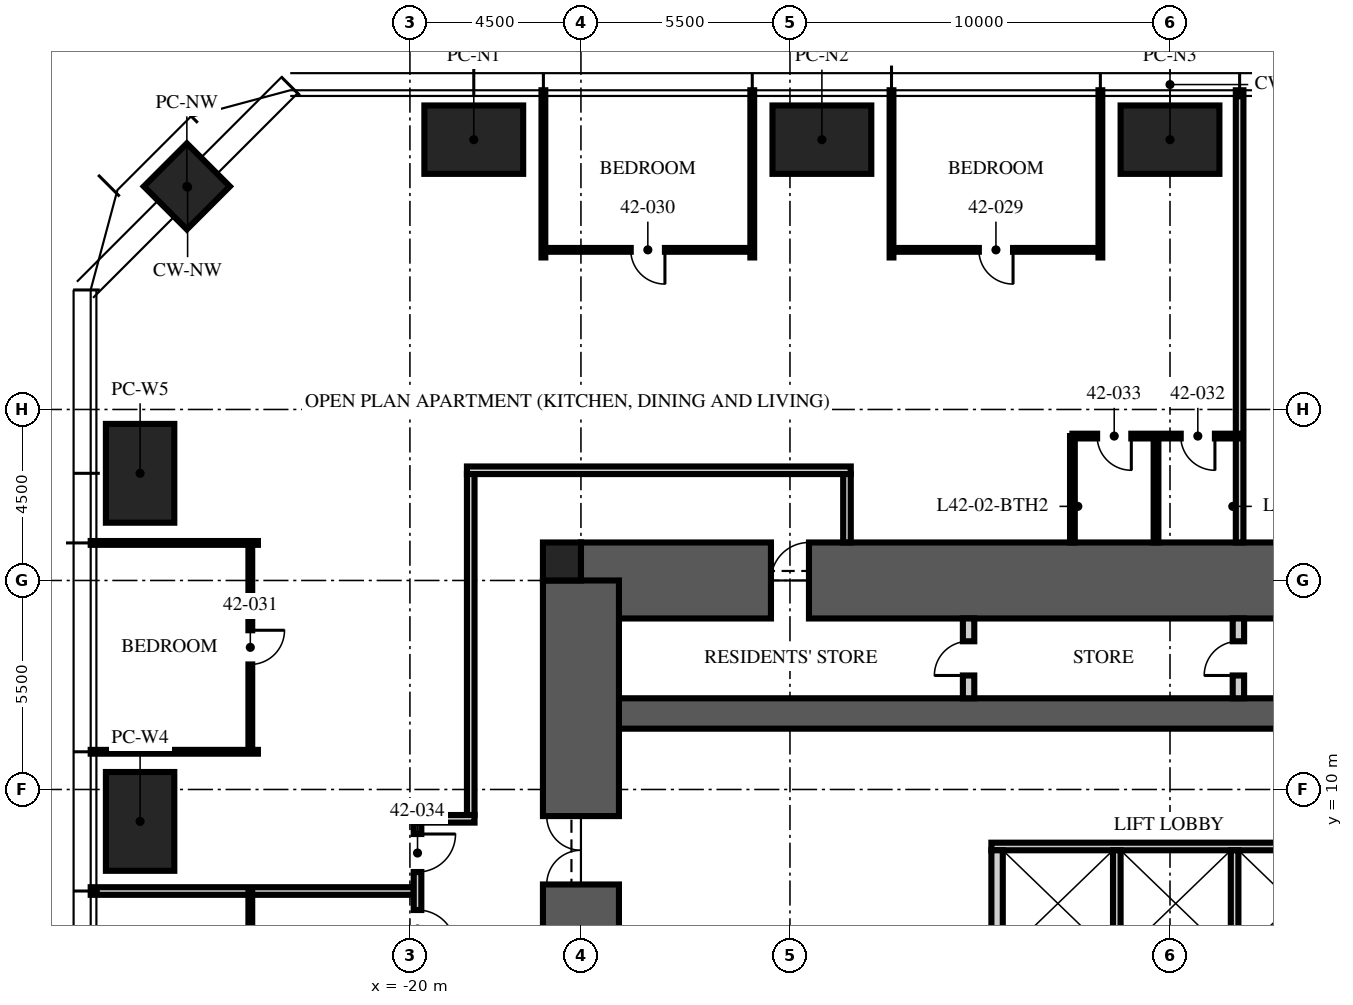
"""IFC4 building model, lengths in metres.
Left out: names, types, materials, properties, quantities, classifications, styles, units other than length and angle.
Written with IfcOpenShell. Run it as: python <this file> out.ifc"""

import sys

from ifc_helpers import new_model, si_unit, direction, frame, frame_2d, origin, origin_2d, place, context, subcontext, project, spatial, rectangle, extrude, element, fill, save


model = new_model("IFC4")
c1 = context("Model", 3, precision=1e-05, world=origin(), true_north=direction((0.0, 1.0)))
c2 = subcontext(c1, "Body", "Model", "MODEL_VIEW")
j1 = project(units=[si_unit("LENGTHUNIT", "METRE"), si_unit("PLANEANGLEUNIT", "RADIAN")], contexts=[c1])
p1 = place(None, origin())
s1 = spatial("IfcSite", under=j1, at=p1, CompositionType="ELEMENT")
p2 = place(p1, origin())
s2 = spatial("IfcBuilding", under=s1, at=p2, CompositionType="ELEMENT")
p3 = place(p2, frame((0.0, 0.0, 167.25)))
s3 = spatial("IfcBuildingStorey", under=s2, at=p3, CompositionType="ELEMENT", Elevation=167.25)
p4 = place(p3, frame((-15.5, 15.5, -0.25), z_axis=(0.0, 0.0, 1.0), x_axis=(1.0, 0.0, 0.0)))
e1 = element("IfcWall", 1, at=p4, inside=s3, PredefinedType="SHEAR", context=c2, shape_type="SweptSolid", body=[
    extrude(rectangle(XDim=31.0, YDim=2.0, at=frame_2d((15.5, 0.0))), origin(), (0.0, 0.0, 1.0), 3.75),
])
p5 = place(p4, frame((5.0, 0.0, 0.25)))
e2 = element("IfcOpeningElement", 2, at=p5, cuts=e1, PredefinedType="OPENING", context=c2, shape_type="SweptSolid", body=[
    extrude(rectangle(XDim=1.0, YDim=2.1, at=frame_2d((0.5, 1.05))), frame((0.0, 1.01, 0.0), z_axis=(0.0, -1.0, 0.0), x_axis=(1.0, 0.0, 0.0)), (0.0, 0.0, 1.0), 2.02),
])
p6 = place(p3, frame((-15.5, 12.0, -0.25), z_axis=(0.0, 0.0, 1.0), x_axis=(1.0, 0.0, 0.0)))
e3 = element("IfcWall", 3, at=p6, inside=s3, PredefinedType="SHEAR", context=c2, shape_type="SweptSolid", body=[
    extrude(rectangle(XDim=31.0, YDim=0.8, at=frame_2d((15.5, 0.0))), origin(), (0.0, 0.0, 1.0), 3.75),
])
p7 = place(p3, frame((-15.5, -15.5, -0.25), z_axis=(0.0, 0.0, 1.0), x_axis=(0.0, 1.0, 0.0)))
e4 = element("IfcWall", 4, at=p7, inside=s3, PredefinedType="SHEAR", context=c2, shape_type="SweptSolid", body=[
    extrude(rectangle(XDim=31.0, YDim=2.0, at=frame_2d((15.5, 0.0))), origin(), (0.0, 0.0, 1.0), 3.75),
])
p8 = place(p7, frame((6.5, 0.0, 0.25)))
e5 = element("IfcOpeningElement", 5, at=p8, cuts=e4, PredefinedType="OPENING", context=c2, shape_type="SweptSolid", body=[
    extrude(rectangle(XDim=1.2, YDim=2.1, at=frame_2d((0.6, 1.05))), frame((0.0, 1.01, 0.0), z_axis=(0.0, -1.0, 0.0), x_axis=(1.0, 0.0, 0.0)), (0.0, 0.0, 1.0), 2.02),
])
p9 = place(p7, frame((23.0, 0.0, 0.25)))
e6 = element("IfcOpeningElement", 6, at=p9, cuts=e4, PredefinedType="OPENING", context=c2, shape_type="SweptSolid", body=[
    extrude(rectangle(XDim=1.8, YDim=2.1, at=frame_2d((0.9, 1.05))), frame((0.0, 1.01, 0.0), z_axis=(0.0, -1.0, 0.0), x_axis=(1.0, 0.0, 0.0)), (0.0, 0.0, 1.0), 2.02),
])
p10 = place(p3, frame((-16.0, 16.0, -0.25), z_axis=(0.0, 0.0, 1.0), x_axis=(1.0, 0.0, 0.0)))
e7 = element("IfcColumn", 7, at=p10, inside=s3, PredefinedType="COLUMN", context=c2, shape_type="SweptSolid", body=[
    extrude(rectangle(XDim=1.0, YDim=1.0, at=origin_2d()), origin(), (0.0, 0.0, 1.0), 3.75),
])
for number, where, z_axis, x_axis in (
    (8, (-18.32, 27.1, 0.0), (0.0, 0.0, 1.0), (1.0, 0.0, 0.0)),
    (9, (-9.16, 27.1, 0.0), (0.0, 0.0, 1.0), (1.0, 0.0, 0.0)),
    (10, (0.0, 27.1, 0.0), (0.0, 0.0, 1.0), (1.0, 0.0, 0.0)),
    (11, (-27.1, 9.16, 0.0), (0.0, 0.0, 1.0), (0.0, 1.0, 0.0)),
    (12, (-27.1, 18.32, 0.0), (0.0, 0.0, 1.0), (0.0, 1.0, 0.0)),
):
    element("IfcColumn", number, at=place(p3, frame(where, z_axis=z_axis, x_axis=x_axis)), inside=s3, PredefinedType="COLUMN", context=c2, shape_type="SweptSolid", body=[
        extrude(rectangle(XDim=2.6, YDim=1.8, at=origin_2d()), origin(), (0.0, 0.0, 1.0), 3.75),
    ])
p11 = place(p3, frame((-25.87, 25.87, 0.0), z_axis=(0.0, 0.0, 1.0), x_axis=(0.707106781187, 0.707106781187, 0.0)))
e13 = element("IfcColumn", 13, at=p11, inside=s3, PredefinedType="COLUMN", context=c2, shape_type="SweptSolid", body=[
    extrude(rectangle(XDim=1.6, YDim=1.6, at=origin_2d()), origin(), (0.0, 0.0, 1.0), 3.75),
])
p12 = place(p3, frame((-4.7, 8.5, 0.0), z_axis=(0.0, 0.0, 1.0), x_axis=(1.0, 0.0, 0.0)))
e14 = element("IfcWall", 14, at=p12, inside=s3, PredefinedType="PARTITIONING", context=c2, shape_type="SweptSolid", body=[
    extrude(rectangle(XDim=9.7, YDim=0.2, at=frame_2d((4.85, 0.0))), origin(), (0.0, 0.0, 1.0), 3.5),
])
p13 = place(p3, frame((-4.55, 5.6, 0.0), z_axis=(0.0, 0.0, 1.0), x_axis=(0.0, 1.0, 0.0)))
e15 = element("IfcWall", 15, at=p13, inside=s3, PredefinedType="PARTITIONING", context=c2, shape_type="SweptSolid", body=[
    extrude(rectangle(XDim=2.8, YDim=0.3, at=frame_2d((1.4, 0.0))), origin(), (0.0, 0.0, 1.0), 3.5),
])
for number, where, z_axis, x_axis in (
    (16, (-1.4, 5.6, 0.0), (0.0, 0.0, 1.0), (0.0, 1.0, 0.0)),
    (17, (1.7, 5.6, 0.0), (0.0, 0.0, 1.0), (0.0, 1.0, 0.0)),
):
    element("IfcWall", number, at=place(p3, frame(where, z_axis=z_axis, x_axis=x_axis)), inside=s3, PredefinedType="PARTITIONING", context=c2, shape_type="SweptSolid", body=[
        extrude(rectangle(XDim=2.8, YDim=0.2, at=frame_2d((1.4, 0.0))), origin(), (0.0, 0.0, 1.0), 3.5),
    ])
p14 = place(p3, frame((-5.3, 12.4, 0.0), z_axis=(0.0, 0.0, 1.0), x_axis=(0.0, 1.0, 0.0)))
e18 = element("IfcWall", 18, at=p14, inside=s3, PredefinedType="PARTITIONING", context=c2, shape_type="SweptSolid", body=[
    extrude(rectangle(XDim=2.1, YDim=0.3, at=frame_2d((1.05, 0.0))), origin(), (0.0, 0.0, 1.0), 3.5),
])
p15 = place(p14, frame((0.6, 0.0, 0.0)))
e19 = element("IfcOpeningElement", 19, at=p15, cuts=e18, PredefinedType="OPENING", context=c2, shape_type="SweptSolid", body=[
    extrude(rectangle(XDim=0.9, YDim=2.1, at=frame_2d((0.45, 1.05))), frame((0.0, 0.16, 0.0), z_axis=(0.0, -1.0, 0.0), x_axis=(1.0, 0.0, 0.0)), (0.0, 0.0, 1.0), 0.32),
])
p16 = place(p3, frame((1.8, 12.4, 0.0), z_axis=(0.0, 0.0, 1.0), x_axis=(0.0, 1.0, 0.0)))
e20 = element("IfcWall", 20, at=p16, inside=s3, PredefinedType="PARTITIONING", context=c2, shape_type="SweptSolid", body=[
    extrude(rectangle(XDim=2.1, YDim=0.3, at=frame_2d((1.05, 0.0))), origin(), (0.0, 0.0, 1.0), 3.5),
])
p17 = place(p16, frame((0.6, 0.0, 0.0)))
e21 = element("IfcOpeningElement", 21, at=p17, cuts=e20, PredefinedType="OPENING", context=c2, shape_type="SweptSolid", body=[
    extrude(rectangle(XDim=0.9, YDim=2.1, at=frame_2d((0.45, 1.05))), frame((0.0, 0.16, 0.0), z_axis=(0.0, -1.0, 0.0), x_axis=(1.0, 0.0, 0.0)), (0.0, 0.0, 1.0), 0.32),
])
p18 = place(p3, frame((-18.5, 18.4, 0.0), z_axis=(0.0, 0.0, 1.0), x_axis=(1.0, 0.0, 0.0)))
e22 = element("IfcWall", 22, at=p18, inside=s3, PredefinedType="PARTITIONING", context=c2, shape_type="SweptSolid", body=[
    extrude(rectangle(XDim=10.1, YDim=0.2, at=frame_2d((5.05, 0.0))), origin(), (0.0, 0.0, 1.0), 2.3),
])
p19 = place(p3, frame((-8.5, 18.3, 0.0), z_axis=(0.0, 0.0, 1.0), x_axis=(0.0, -1.0, 0.0)))
e23 = element("IfcWall", 23, at=p19, inside=s3, PredefinedType="PARTITIONING", context=c2, shape_type="SweptSolid", body=[
    extrude(rectangle(XDim=1.8, YDim=0.2, at=frame_2d((0.9, 0.0))), origin(), (0.0, 0.0, 1.0), 3.5),
])
p20 = place(p3, frame((1.832, 16.5, 0.0), z_axis=(0.0, 0.0, 1.0), x_axis=(0.0, 1.0, 0.0)))
e24 = element("IfcWall", 24, at=p20, inside=s3, PredefinedType="PARTITIONING", context=c2, shape_type="SweptSolid", body=[
    extrude(rectangle(XDim=11.9, YDim=0.2, at=frame_2d((5.95, 0.0))), origin(), (0.0, 0.0, 1.0), 2.81),
])
for number, where, z_axis, x_axis in (
    (25, (-1.832, 24.0, 0.0), (0.0, 0.0, 1.0), (0.0, 1.0, 0.0)),
    (26, (-7.328, 24.0, 0.0), (0.0, 0.0, 1.0), (0.0, 1.0, 0.0)),
    (27, (-10.992, 24.0, 0.0), (0.0, 0.0, 1.0), (0.0, 1.0, 0.0)),
    (28, (-16.488, 24.0, 0.0), (0.0, 0.0, 1.0), (0.0, 1.0, 0.0)),
    (29, (-24.0, 16.488, 0.0), (0.0, 0.0, 1.0), (-1.0, 0.0, 0.0)),
    (30, (-24.0, 10.992, 0.0), (0.0, 0.0, 1.0), (-1.0, 0.0, 0.0)),
):
    element("IfcWall", number, at=place(p3, frame(where, z_axis=z_axis, x_axis=x_axis)), inside=s3, PredefinedType="PARTITIONING", context=c2, shape_type="SweptSolid", body=[
        extrude(rectangle(XDim=4.4, YDim=0.1, at=frame_2d((2.2, 0.0))), origin(), (0.0, 0.0, 1.0), 2.81),
    ])
p21 = place(p3, frame((-19.9, 7.328, 0.0), z_axis=(0.0, 0.0, 1.0), x_axis=(-1.0, 0.0, 0.0)))
e31 = element("IfcWall", 31, at=p21, inside=s3, PredefinedType="PARTITIONING", context=c2, shape_type="SweptSolid", body=[
    extrude(rectangle(XDim=8.5, YDim=0.2, at=frame_2d((4.25, 0.0))), origin(), (0.0, 0.0, 1.0), 2.81),
])
p22 = place(p3, frame((-1.832, 24.2, 0.0), z_axis=(0.0, 0.0, 1.0), x_axis=(-1.0, 0.0, 0.0)))
e32 = element("IfcWall", 32, at=p22, inside=s3, PredefinedType="PARTITIONING", context=c2, shape_type="SweptSolid", body=[
    extrude(rectangle(XDim=5.496, YDim=0.1, at=frame_2d((2.748, 0.0))), origin(), (0.0, 0.0, 1.0), 2.81),
])
p23 = place(p22, frame((2.298, 0.0, 0.0)))
e33 = element("IfcOpeningElement", 33, at=p23, cuts=e32, PredefinedType="OPENING", context=c2, shape_type="SweptSolid", body=[
    extrude(rectangle(XDim=0.9, YDim=2.1, at=frame_2d((0.45, 1.05))), frame((0.0, 0.06, 0.0), z_axis=(0.0, -1.0, 0.0), x_axis=(1.0, 0.0, 0.0)), (0.0, 0.0, 1.0), 0.12),
])
p24 = place(p3, frame((-10.992, 24.2, 0.0), z_axis=(0.0, 0.0, 1.0), x_axis=(-1.0, 0.0, 0.0)))
e34 = element("IfcWall", 34, at=p24, inside=s3, PredefinedType="PARTITIONING", context=c2, shape_type="SweptSolid", body=[
    extrude(rectangle(XDim=5.496, YDim=0.1, at=frame_2d((2.748, 0.0))), origin(), (0.0, 0.0, 1.0), 2.81),
])
p25 = place(p24, frame((2.298, 0.0, 0.0)))
e35 = element("IfcOpeningElement", 35, at=p25, cuts=e34, PredefinedType="OPENING", context=c2, shape_type="SweptSolid", body=[
    extrude(rectangle(XDim=0.9, YDim=2.1, at=frame_2d((0.45, 1.05))), frame((0.0, 0.06, 0.0), z_axis=(0.0, -1.0, 0.0), x_axis=(1.0, 0.0, 0.0)), (0.0, 0.0, 1.0), 0.12),
])
p26 = place(p3, frame((-24.2, 16.488, 0.0), z_axis=(0.0, 0.0, 1.0), x_axis=(0.0, -1.0, 0.0)))
e36 = element("IfcWall", 36, at=p26, inside=s3, PredefinedType="PARTITIONING", context=c2, shape_type="SweptSolid", body=[
    extrude(rectangle(XDim=5.496, YDim=0.1, at=frame_2d((2.748, 0.0))), origin(), (0.0, 0.0, 1.0), 2.81),
])
p27 = place(p26, frame((2.298, 0.0, 0.0)))
e37 = element("IfcOpeningElement", 37, at=p27, cuts=e36, PredefinedType="OPENING", context=c2, shape_type="SweptSolid", body=[
    extrude(rectangle(XDim=0.9, YDim=2.1, at=frame_2d((0.45, 1.05))), frame((0.0, 0.06, 0.0), z_axis=(0.0, -1.0, 0.0), x_axis=(1.0, 0.0, 0.0)), (0.0, 0.0, 1.0), 0.12),
])
p28 = place(p3, frame((1.832, 19.3, 0.0), z_axis=(0.0, 0.0, 1.0), x_axis=(-1.0, 0.0, 0.0)))
e38 = element("IfcWall", 38, at=p28, inside=s3, PredefinedType="PARTITIONING", context=c2, shape_type="SweptSolid", body=[
    extrude(rectangle(XDim=4.4, YDim=0.125, at=frame_2d((2.2, 0.0))), origin(), (0.0, 0.0, 1.0), 2.7),
])
p29 = place(p28, frame((0.65, 0.0, 0.0)))
e39 = element("IfcOpeningElement", 39, at=p29, cuts=e38, PredefinedType="OPENING", context=c2, shape_type="SweptSolid", body=[
    extrude(rectangle(XDim=0.9, YDim=2.1, at=frame_2d((0.45, 1.05))), frame((0.0, 0.073, 0.0), z_axis=(0.0, -1.0, 0.0), x_axis=(1.0, 0.0, 0.0)), (0.0, 0.0, 1.0), 0.145),
])
p30 = place(p28, frame((2.85, 0.0, 0.0)))
e40 = element("IfcOpeningElement", 40, at=p30, cuts=e38, PredefinedType="OPENING", context=c2, shape_type="SweptSolid", body=[
    extrude(rectangle(XDim=0.9, YDim=2.1, at=frame_2d((0.45, 1.05))), frame((0.0, 0.073, 0.0), z_axis=(0.0, -1.0, 0.0), x_axis=(1.0, 0.0, 0.0)), (0.0, 0.0, 1.0), 0.145),
])
for number, where, z_axis, x_axis in (
    (41, (-0.368, 16.5, 0.0), (0.0, 0.0, 1.0), (0.0, 1.0, 0.0)),
    (42, (-2.568, 16.5, 0.0), (0.0, 0.0, 1.0), (0.0, 1.0, 0.0)),
):
    element("IfcWall", number, at=place(p3, frame(where, z_axis=z_axis, x_axis=x_axis)), inside=s3, PredefinedType="PARTITIONING", context=c2, shape_type="SweptSolid", body=[
        extrude(rectangle(XDim=2.8, YDim=0.125, at=frame_2d((1.4, 0.0))), origin(), (0.0, 0.0, 1.0), 3.5),
    ])
p31 = place(p3, frame((-24.2, 7.328, 0.0), z_axis=(0.0, 0.0, 1.0), x_axis=(0.0, -1.0, 0.0)))
e43 = element("IfcWall", 43, at=p31, inside=s3, PredefinedType="PARTITIONING", context=c2, shape_type="SweptSolid", body=[
    extrude(rectangle(XDim=5.496, YDim=0.1, at=frame_2d((2.748, 0.0))), origin(), (0.0, 0.0, 1.0), 2.81),
])
p32 = place(p31, frame((2.298, 0.0, 0.0)))
e44 = element("IfcOpeningElement", 44, at=p32, cuts=e43, PredefinedType="OPENING", context=c2, shape_type="SweptSolid", body=[
    extrude(rectangle(XDim=0.9, YDim=2.1, at=frame_2d((0.45, 1.05))), frame((0.0, 0.06, 0.0), z_axis=(0.0, -1.0, 0.0), x_axis=(1.0, 0.0, 0.0)), (0.0, 0.0, 1.0), 0.12),
])
p33 = place(p3, frame((-18.4, 18.3, 0.0), z_axis=(0.0, 0.0, 1.0), x_axis=(0.0, -1.0, 0.0)))
e45 = element("IfcWall", 45, at=p33, inside=s3, PredefinedType="PARTITIONING", context=c2, shape_type="SweptSolid", body=[
    extrude(rectangle(XDim=8.972, YDim=0.2, at=frame_2d((4.486, 0.0))), origin(), (0.0, 0.0, 1.0), 2.3),
])
p34 = place(p3, frame((-18.3, 9.228, 0.0), z_axis=(0.0, 0.0, 1.0), x_axis=(-1.0, 0.0, 0.0)))
e46 = element("IfcWall", 46, at=p34, inside=s3, PredefinedType="PARTITIONING", context=c2, shape_type="SweptSolid", body=[
    extrude(rectangle(XDim=1.6, YDim=0.2, at=frame_2d((0.8, 0.0))), origin(), (0.0, 0.0, 1.0), 2.7),
])
p35 = place(p3, frame((-19.8, 9.128, 0.0), z_axis=(0.0, 0.0, 1.0), x_axis=(0.0, -1.0, 0.0)))
e47 = element("IfcWall", 47, at=p35, inside=s3, PredefinedType="PARTITIONING", context=c2, shape_type="SweptSolid", body=[
    extrude(rectangle(XDim=3.6, YDim=0.2, at=frame_2d((1.8, 0.0))), origin(), (0.0, 0.0, 1.0), 2.7),
])
p36 = place(p35, frame((0.3, 0.0, 0.0)))
e48 = element("IfcOpeningElement", 48, at=p36, cuts=e47, PredefinedType="OPENING", context=c2, shape_type="SweptSolid", body=[
    extrude(rectangle(XDim=1.0, YDim=2.2, at=frame_2d((0.5, 1.1))), frame((0.0, 0.11, 0.0), z_axis=(0.0, -1.0, 0.0), x_axis=(1.0, 0.0, 0.0)), (0.0, 0.0, 1.0), 0.22),
])
p37 = place(p35, frame((2.3, 0.0, 0.0)))
e49 = element("IfcOpeningElement", 49, at=p37, cuts=e47, PredefinedType="OPENING", context=c2, shape_type="SweptSolid", body=[
    extrude(rectangle(XDim=1.0, YDim=2.2, at=frame_2d((0.5, 1.1))), frame((0.0, 0.11, 0.0), z_axis=(0.0, -1.0, 0.0), x_axis=(1.0, 0.0, 0.0)), (0.0, 0.0, 1.0), 0.22),
])
p38 = place(p9, origin())
e50 = element("IfcDoor", 50, at=p38, inside=s3, OperationType="DOUBLE_DOOR_SINGLE_SWING", PredefinedType="DOOR", context=c2, shape_type="SweptSolid", body=[
    extrude(rectangle(XDim=1.8, YDim=2.1, at=frame_2d((0.9, 1.05))), frame((0.0, 0.025, 0.0), z_axis=(0.0, -1.0, 0.0), x_axis=(1.0, 0.0, 0.0)), (0.0, 0.0, 1.0), 0.05),
])
fill(e6, e50)
p39 = place(p15, origin())
e51 = element("IfcDoor", 51, at=p39, inside=s3, OperationType="SINGLE_SWING_LEFT", PredefinedType="DOOR", context=c2, shape_type="SweptSolid", body=[
    extrude(rectangle(XDim=0.9, YDim=2.1, at=frame_2d((0.45, 1.05))), frame((0.0, 0.025, 0.0), z_axis=(0.0, -1.0, 0.0), x_axis=(1.0, 0.0, 0.0)), (0.0, 0.0, 1.0), 0.05),
])
fill(e19, e51)
p40 = place(p17, origin())
e52 = element("IfcDoor", 52, at=p40, inside=s3, OperationType="SINGLE_SWING_LEFT", PredefinedType="DOOR", context=c2, shape_type="SweptSolid", body=[
    extrude(rectangle(XDim=0.9, YDim=2.1, at=frame_2d((0.45, 1.05))), frame((0.0, 0.025, 0.0), z_axis=(0.0, -1.0, 0.0), x_axis=(1.0, 0.0, 0.0)), (0.0, 0.0, 1.0), 0.05),
])
fill(e21, e52)
p41 = place(p5, origin())
e53 = element("IfcDoor", 53, at=p41, inside=s3, OperationType="SINGLE_SWING_RIGHT", PredefinedType="DOOR", context=c2, shape_type="SweptSolid", body=[
    extrude(rectangle(XDim=1.0, YDim=2.1, at=frame_2d((0.5, 1.05))), frame((0.0, 0.025, 0.0), z_axis=(0.0, -1.0, 0.0), x_axis=(1.0, 0.0, 0.0)), (0.0, 0.0, 1.0), 0.05),
])
fill(e2, e53)
p42 = place(p23, origin())
e54 = element("IfcDoor", 54, at=p42, inside=s3, OperationType="SINGLE_SWING_LEFT", PredefinedType="DOOR", context=c2, shape_type="SweptSolid", body=[
    extrude(rectangle(XDim=0.9, YDim=2.1, at=frame_2d((0.45, 1.05))), frame((0.0, 0.025, 0.0), z_axis=(0.0, -1.0, 0.0), x_axis=(1.0, 0.0, 0.0)), (0.0, 0.0, 1.0), 0.05),
])
fill(e33, e54)
p43 = place(p25, origin())
e55 = element("IfcDoor", 55, at=p43, inside=s3, OperationType="SINGLE_SWING_LEFT", PredefinedType="DOOR", context=c2, shape_type="SweptSolid", body=[
    extrude(rectangle(XDim=0.9, YDim=2.1, at=frame_2d((0.45, 1.05))), frame((0.0, 0.025, 0.0), z_axis=(0.0, -1.0, 0.0), x_axis=(1.0, 0.0, 0.0)), (0.0, 0.0, 1.0), 0.05),
])
fill(e35, e55)
p44 = place(p27, origin())
e56 = element("IfcDoor", 56, at=p44, inside=s3, OperationType="SINGLE_SWING_LEFT", PredefinedType="DOOR", context=c2, shape_type="SweptSolid", body=[
    extrude(rectangle(XDim=0.9, YDim=2.1, at=frame_2d((0.45, 1.05))), frame((0.0, 0.025, 0.0), z_axis=(0.0, -1.0, 0.0), x_axis=(1.0, 0.0, 0.0)), (0.0, 0.0, 1.0), 0.05),
])
fill(e37, e56)
p45 = place(p29, origin())
e57 = element("IfcDoor", 57, at=p45, inside=s3, OperationType="SINGLE_SWING_LEFT", PredefinedType="DOOR", context=c2, shape_type="SweptSolid", body=[
    extrude(rectangle(XDim=0.9, YDim=2.1, at=frame_2d((0.45, 1.05))), frame((0.0, 0.025, 0.0), z_axis=(0.0, -1.0, 0.0), x_axis=(1.0, 0.0, 0.0)), (0.0, 0.0, 1.0), 0.05),
])
fill(e39, e57)
p46 = place(p30, origin())
e58 = element("IfcDoor", 58, at=p46, inside=s3, OperationType="SINGLE_SWING_LEFT", PredefinedType="DOOR", context=c2, shape_type="SweptSolid", body=[
    extrude(rectangle(XDim=0.9, YDim=2.1, at=frame_2d((0.45, 1.05))), frame((0.0, 0.025, 0.0), z_axis=(0.0, -1.0, 0.0), x_axis=(1.0, 0.0, 0.0)), (0.0, 0.0, 1.0), 0.05),
])
fill(e40, e58)
p47 = place(p36, origin())
e59 = element("IfcDoor", 59, at=p47, inside=s3, OperationType="SINGLE_SWING_LEFT", PredefinedType="DOOR", context=c2, shape_type="SweptSolid", body=[
    extrude(rectangle(XDim=1.0, YDim=2.2, at=frame_2d((0.5, 1.1))), frame((0.0, 0.025, 0.0), z_axis=(0.0, -1.0, 0.0), x_axis=(1.0, 0.0, 0.0)), (0.0, 0.0, 1.0), 0.05),
])
fill(e48, e59)
p48 = place(p37, origin())
e60 = element("IfcDoor", 60, at=p48, inside=s3, OperationType="SINGLE_SWING_RIGHT", PredefinedType="DOOR", context=c2, shape_type="SweptSolid", body=[
    extrude(rectangle(XDim=1.0, YDim=2.2, at=frame_2d((0.5, 1.1))), frame((0.0, 0.025, 0.0), z_axis=(0.0, -1.0, 0.0), x_axis=(1.0, 0.0, 0.0)), (0.0, 0.0, 1.0), 0.05),
])
fill(e49, e60)
save(model, sys.argv[1])
